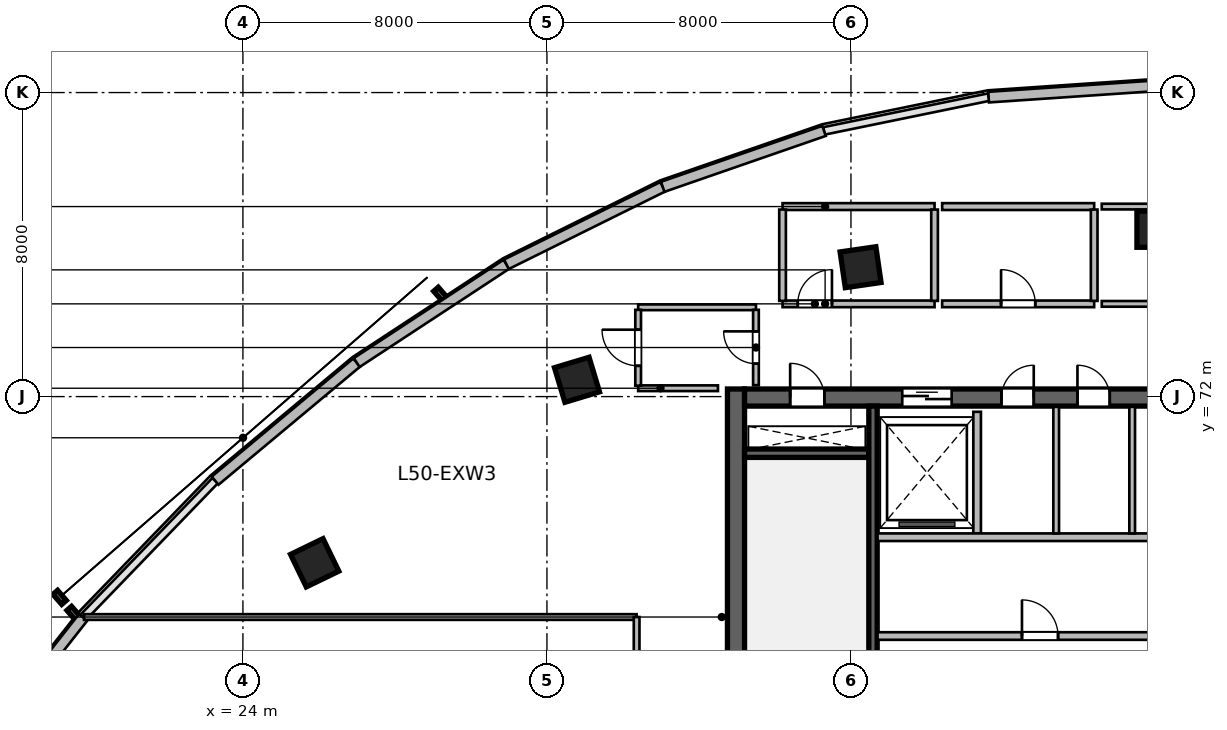
"""IFC4 building model, lengths in metres.
Left out: names, types, materials, properties, quantities, classifications, styles, units other than length and angle.
Written with IfcOpenShell. Run it as: python <this file> out.ifc"""

import sys

from ifc_helpers import new_model, si_unit, direction, frame, frame_2d, origin, origin_2d, place, context, subcontext, project, spatial, rectangle, extrude, source, transform, mapped, element, fill, save


model = new_model("IFC4")
c1 = context("Model", 3, precision=1e-05, world=origin(), true_north=direction((0.0, 1.0)))
c2 = subcontext(c1, "Body", "Model", "MODEL_VIEW")
j1 = project(units=[si_unit("LENGTHUNIT", "METRE"), si_unit("PLANEANGLEUNIT", "RADIAN")], contexts=[c1])
p1 = place(None, origin())
s1 = spatial("IfcSite", under=j1, at=p1, CompositionType="ELEMENT")
p2 = place(p1, origin())
s2 = spatial("IfcBuilding", under=s1, at=p2, CompositionType="ELEMENT")
p3 = place(p2, frame((0.0, 0.0, 207.9)))
s3 = spatial("IfcBuildingStorey", under=s2, at=p3, CompositionType="ELEMENT", Elevation=207.9)
m1 = source(origin(), c2, "Body", "SweptSolid", [
    extrude(rectangle(XDim=12.0, YDim=0.45, at=frame_2d((6.0, 0.0))), origin(), (0.0, 0.0, 1.0), 3.9),
])
p4 = place(p3, frame((36.975, 60.2, 0.0), z_axis=(0.0, 0.0, 1.0), x_axis=(0.0, 1.0, 0.0)))
e1 = element("IfcWall", 1, at=p4, inside=s3, PredefinedType="SHEAR", context=c2, shape_type="MappedRepresentation", body=[
    mapped(m1, transform((0.0, 0.0, 0.0), scale=1.0)),
])
m2 = source(origin(), c2, "Body", "SweptSolid", [
    extrude(rectangle(XDim=21.6, YDim=0.45, at=frame_2d((10.8, 0.0))), origin(), (0.0, 0.0, 1.0), 3.9),
])
p5 = place(p3, frame((37.2, 71.975, 0.0), z_axis=(0.0, 0.0, 1.0), x_axis=(1.0, 0.0, 0.0)))
e2 = element("IfcWall", 2, at=p5, inside=s3, PredefinedType="SHEAR", context=c2, shape_type="MappedRepresentation", body=[
    mapped(m2, transform((0.0, 0.0, 0.0), scale=1.0)),
])
p6 = place(p5, frame((1.2, 0.0, 0.0)))
e3 = element("IfcOpeningElement", 3, at=p6, cuts=e2, PredefinedType="OPENING", context=c2, shape_type="SweptSolid", body=[
    extrude(rectangle(XDim=0.9, YDim=2.1, at=frame_2d((0.45, 1.05))), frame((0.0, 0.235, 0.0), z_axis=(0.0, -1.0, 0.0), x_axis=(1.0, 0.0, 0.0)), (0.0, 0.0, 1.0), 0.47),
])
p7 = place(p5, frame((14.7, 0.0, 0.0)))
e4 = element("IfcOpeningElement", 4, at=p7, cuts=e2, PredefinedType="OPENING", context=c2, shape_type="SweptSolid", body=[
    extrude(rectangle(XDim=1.2, YDim=2.15, at=frame_2d((0.6, 1.075))), frame((0.0, 0.235, 0.0), z_axis=(0.0, -1.0, 0.0), x_axis=(1.0, 0.0, 0.0)), (0.0, 0.0, 1.0), 0.47),
])
p8 = place(p5, frame((4.15, 0.0, 0.0)))
e5 = element("IfcOpeningElement", 5, at=p8, cuts=e2, PredefinedType="OPENING", context=c2, shape_type="SweptSolid", body=[
    extrude(rectangle(XDim=1.3, YDim=2.15, at=frame_2d((0.65, 1.075))), frame((0.0, 0.235, 0.0), z_axis=(0.0, -1.0, 0.0), x_axis=(1.0, 0.0, 0.0)), (0.0, 0.0, 1.0), 0.47),
])
p9 = place(p5, frame((6.76, 0.0, 0.0)))
e6 = element("IfcOpeningElement", 6, at=p9, cuts=e2, PredefinedType="OPENING", context=c2, shape_type="SweptSolid", body=[
    extrude(rectangle(XDim=0.85, YDim=2.1, at=frame_2d((0.425, 1.05))), frame((0.0, 0.235, 0.0), z_axis=(0.0, -1.0, 0.0), x_axis=(1.0, 0.0, 0.0)), (0.0, 0.0, 1.0), 0.47),
])
p10 = place(p5, frame((8.76, 0.0, 0.0)))
e7 = element("IfcOpeningElement", 7, at=p10, cuts=e2, PredefinedType="OPENING", context=c2, shape_type="SweptSolid", body=[
    extrude(rectangle(XDim=0.85, YDim=2.1, at=frame_2d((0.425, 1.05))), frame((0.0, 0.235, 0.0), z_axis=(0.0, -1.0, 0.0), x_axis=(1.0, 0.0, 0.0)), (0.0, 0.0, 1.0), 0.47),
])
p11 = place(p5, frame((10.725, 0.0, 0.0)))
e8 = element("IfcOpeningElement", 8, at=p11, cuts=e2, PredefinedType="OPENING", context=c2, shape_type="SweptSolid", body=[
    extrude(rectangle(XDim=0.85, YDim=2.1, at=frame_2d((0.425, 1.05))), frame((0.0, 0.235, 0.0), z_axis=(0.0, -1.0, 0.0), x_axis=(1.0, 0.0, 0.0)), (0.0, 0.0, 1.0), 0.47),
])
m3 = source(origin(), c2, "Body", "SweptSolid", [
    extrude(rectangle(XDim=3.27, YDim=0.22, at=frame_2d((1.635, 0.0))), origin(), (0.0, 0.0, 1.0), 3.9),
])
p12 = place(p3, frame((37.2, 70.51, 0.0), z_axis=(0.0, 0.0, 1.0), x_axis=(1.0, 0.0, 0.0)))
e9 = element("IfcWall", 9, at=p12, inside=s3, PredefinedType="SHEAR", context=c2, shape_type="MappedRepresentation", body=[
    mapped(m3, transform((0.0, 0.0, 0.0), scale=1.0)),
])
m4 = source(origin(), c2, "Body", "SweptSolid", [
    extrude(rectangle(XDim=11.1, YDim=0.22, at=frame_2d((5.55, 0.0))), origin(), (0.0, 0.0, 1.0), 3.9),
])
p13 = place(p3, frame((40.58, 60.65, 0.0), z_axis=(0.0, 0.0, 1.0), x_axis=(0.0, 1.0, 0.0)))
e10 = element("IfcWall", 10, at=p13, inside=s3, PredefinedType="SHEAR", context=c2, shape_type="MappedRepresentation", body=[
    mapped(m4, transform((0.0, 0.0, 0.0), scale=1.0)),
])
m5 = source(origin(), c2, "Body", "SweptSolid", [
    extrude(rectangle(XDim=0.95, YDim=0.95, at=origin_2d()), origin(), (0.0, 0.0, 1.0), 3.9),
])
for number, where, z_axis, x_axis in (
    (11, (25.888, 67.627, 0.0), (0.0, 0.0, 1.0), (-0.436, 0.9, 0.0)),
    (12, (32.791, 72.442, 0.0), (0.0, 0.0, 1.0), (-0.289, 0.957, 0.0)),
    (13, (40.253, 75.404, 0.0), (0.0, 0.0, 1.0), (-0.143, 0.99, 0.0)),
    (14, (48.0, 76.404, 0.0), (0.0, 0.0, 1.0), (0.0, 1.0, 0.0)),
):
    element("IfcColumn", number, at=place(p3, frame(where, z_axis=z_axis, x_axis=x_axis)), inside=s3, PredefinedType="COLUMN", context=c2, shape_type="MappedRepresentation", body=[
        mapped(m5, transform((0.0, 0.0, 0.0), scale=1.0)),
    ])
m6 = source(origin(), c2, "Body", "SweptSolid", [
    extrude(rectangle(XDim=5.153, YDim=0.28, at=frame_2d((2.577, 0.0))), origin(), (0.0, 0.0, 1.0), 3.64),
])
p14 = place(p3, frame((16.609, 62.14, 0.0), z_axis=(0.0, 0.0, 1.0), x_axis=(0.618179283891, 0.786037132054, 0.0)))
e15 = element("IfcWall", 15, at=p14, inside=s3, PredefinedType="SOLIDWALL", context=c2, shape_type="MappedRepresentation", body=[
    mapped(m6, transform((0.0, 0.0, 0.0), scale=1.0)),
])
m7 = source(origin(), c2, "Body", "SweptSolid", [
    extrude(rectangle(XDim=4.852, YDim=0.28, at=frame_2d((2.426, 0.0))), origin(), (0.0, 0.0, 1.0), 3.64),
])
p15 = place(p3, frame((23.268, 69.788, 0.0), z_axis=(0.0, 0.0, 1.0), x_axis=(0.767936605821, 0.640525853843, 0.0)))
e16 = element("IfcWall", 16, at=p15, inside=s3, PredefinedType="SOLIDWALL", context=c2, shape_type="MappedRepresentation", body=[
    mapped(m7, transform((0.0, 0.0, 0.0), scale=1.0)),
])
m8 = source(origin(), c2, "Body", "SweptSolid", [
    extrude(rectangle(XDim=4.713, YDim=0.28, at=frame_2d((2.356, 0.0))), origin(), (0.0, 0.0, 1.0), 3.64),
])
p16 = place(p3, frame((26.994, 72.896, 0.0), z_axis=(0.0, 0.0, 1.0), x_axis=(0.835974386457, 0.548768462275, 0.0)))
e17 = element("IfcWall", 17, at=p16, inside=s3, PredefinedType="SOLIDWALL", context=c2, shape_type="MappedRepresentation", body=[
    mapped(m8, transform((0.0, 0.0, 0.0), scale=1.0)),
])
m9 = source(origin(), c2, "Body", "SweptSolid", [
    extrude(rectangle(XDim=4.59, YDim=0.28, at=frame_2d((2.295, 0.0))), origin(), (0.0, 0.0, 1.0), 3.64),
])
p17 = place(p3, frame((30.934, 75.482, 0.0), z_axis=(0.0, 0.0, 1.0), x_axis=(0.895974834987, 0.444104824418, 0.0)))
e18 = element("IfcWall", 18, at=p17, inside=s3, PredefinedType="SOLIDWALL", context=c2, shape_type="MappedRepresentation", body=[
    mapped(m9, transform((0.0, 0.0, 0.0), scale=1.0)),
])
m10 = source(origin(), c2, "Body", "SweptSolid", [
    extrude(rectangle(XDim=4.492, YDim=0.28, at=frame_2d((2.246, 0.0))), origin(), (0.0, 0.0, 1.0), 3.64),
])
p18 = place(p3, frame((35.046, 77.52, 0.0), z_axis=(0.0, 0.0, 1.0), x_axis=(0.944872297412, 0.32743906545, 0.0)))
e19 = element("IfcWall", 19, at=p18, inside=s3, PredefinedType="SOLIDWALL", context=c2, shape_type="MappedRepresentation", body=[
    mapped(m10, transform((0.0, 0.0, 0.0), scale=1.0)),
])
m11 = source(origin(), c2, "Body", "SweptSolid", [
    extrude(rectangle(XDim=4.387, YDim=0.28, at=frame_2d((2.193, 0.0))), origin(), (0.0, 0.0, 1.0), 3.64),
])
p19 = place(p3, frame((43.623, 79.879, 0.0), z_axis=(0.0, 0.0, 1.0), x_axis=(0.997703650546, 0.06773053733, 0.0)))
e20 = element("IfcWall", 20, at=p19, inside=s3, PredefinedType="SOLIDWALL", context=c2, shape_type="MappedRepresentation", body=[
    mapped(m11, transform((0.0, 0.0, 0.0), scale=1.0)),
])
m12 = source(origin(), c2, "Body", "SweptSolid", [
    extrude(rectangle(XDim=3.2, YDim=0.2, at=frame_2d((1.6, 0.0))), origin(), (0.0, 0.0, 1.0), 3.64),
])
p20 = place(p3, frame((43.32, 68.4, 0.0), z_axis=(0.0, 0.0, 1.0), x_axis=(0.0, 1.0, 0.0)))
e21 = element("IfcWall", 21, at=p20, inside=s3, PredefinedType="SOLIDWALL", context=c2, shape_type="MappedRepresentation", body=[
    mapped(m12, transform((0.0, 0.0, 0.0), scale=1.0)),
])
m13 = source(origin(), c2, "Body", "SweptSolid", [
    extrude(rectangle(XDim=8.8, YDim=0.2, at=frame_2d((4.4, 0.0))), origin(), (0.0, 0.0, 1.0), 3.64),
])
p21 = place(p3, frame((40.7, 68.3, 0.0), z_axis=(0.0, 0.0, 1.0), x_axis=(1.0, 0.0, 0.0)))
e22 = element("IfcWall", 22, at=p21, inside=s3, PredefinedType="SOLIDWALL", context=c2, shape_type="MappedRepresentation", body=[
    mapped(m13, transform((0.0, 0.0, 0.0), scale=1.0)),
])
m14 = source(origin(), c2, "Body", "SweptSolid", [
    extrude(rectangle(XDim=3.33, YDim=0.15, at=frame_2d((1.665, 0.0))), origin(), (0.0, 0.0, 1.0), 3.64),
])
for number, where, z_axis, x_axis in (
    (23, (45.4, 68.4, 0.0), (0.0, 0.0, 1.0), (0.0, 1.0, 0.0)),
    (24, (47.4, 68.4, 0.0), (0.0, 0.0, 1.0), (0.0, 1.0, 0.0)),
):
    element("IfcWall", number, at=place(p3, frame(where, z_axis=z_axis, x_axis=x_axis)), inside=s3, PredefinedType="PARTITIONING", context=c2, shape_type="MappedRepresentation", body=[
        mapped(m14, transform((0.0, 0.0, 0.0), scale=1.0)),
    ])
p22 = place(p3, frame((40.7, 65.7, 0.0), z_axis=(0.0, 0.0, 1.0), x_axis=(1.0, 0.0, 0.0)))
e25 = element("IfcWall", 25, at=p22, inside=s3, PredefinedType="SOLIDWALL", context=c2, shape_type="MappedRepresentation", body=[
    mapped(m13, transform((0.0, 0.0, 0.0), scale=1.0)),
])
p23 = place(p22, frame((3.8, 0.0, 0.0)))
e26 = element("IfcOpeningElement", 26, at=p23, cuts=e25, PredefinedType="OPENING", context=c2, shape_type="SweptSolid", body=[
    extrude(rectangle(XDim=0.95, YDim=2.15, at=frame_2d((0.475, 1.075))), frame((0.0, 0.11, 0.0), z_axis=(0.0, -1.0, 0.0), x_axis=(1.0, 0.0, 0.0)), (0.0, 0.0, 1.0), 0.22),
])
m15 = source(origin(), c2, "Body", "SweptSolid", [
    extrude(rectangle(XDim=2.1, YDim=0.15, at=frame_2d((1.05, 0.0))), origin(), (0.0, 0.0, 1.0), 3.64),
])
p24 = place(p3, frame((34.4, 72.22, 0.0), z_axis=(0.0, 0.0, 1.0), x_axis=(1.0, 0.0, 0.0)))
e27 = element("IfcWall", 27, at=p24, inside=s3, PredefinedType="PARTITIONING", context=c2, shape_type="MappedRepresentation", body=[
    mapped(m15, transform((0.0, 0.0, 0.0), scale=1.0)),
])
m16 = source(origin(), c2, "Body", "SweptSolid", [
    extrude(rectangle(XDim=3.1, YDim=0.15, at=frame_2d((1.55, 0.0))), origin(), (0.0, 0.0, 1.0), 3.071),
])
p25 = place(p3, frame((34.4, 74.35, 0.0), z_axis=(0.0, 0.0, 1.0), x_axis=(1.0, 0.0, 0.0)))
e28 = element("IfcWall", 28, at=p25, inside=s3, PredefinedType="PARTITIONING", context=c2, shape_type="MappedRepresentation", body=[
    mapped(m16, transform((0.0, 0.0, 0.0), scale=1.0)),
])
m17 = source(origin(), c2, "Body", "SweptSolid", [
    extrude(rectangle(XDim=1.995, YDim=0.15, at=frame_2d((0.998, 0.0))), origin(), (0.0, 0.0, 1.0), 3.64),
])
p26 = place(p3, frame((34.4, 72.288, 0.0), z_axis=(0.0, 0.0, 1.0), x_axis=(0.0, 1.0, 0.0)))
e29 = element("IfcWall", 29, at=p26, inside=s3, PredefinedType="PARTITIONING", context=c2, shape_type="MappedRepresentation", body=[
    mapped(m17, transform((0.0, 0.0, 0.0), scale=1.0)),
])
p27 = place(p26, frame((0.522, 0.0, 0.0)))
e30 = element("IfcOpeningElement", 30, at=p27, cuts=e29, PredefinedType="OPENING", context=c2, shape_type="SweptSolid", body=[
    extrude(rectangle(XDim=0.95, YDim=2.1, at=frame_2d((0.475, 1.05))), frame((0.0, 0.085, 0.0), z_axis=(0.0, -1.0, 0.0), x_axis=(1.0, 0.0, 0.0)), (0.0, 0.0, 1.0), 0.17),
])
m18 = source(origin(), c2, "Body", "SweptSolid", [
    extrude(rectangle(XDim=1.982, YDim=0.15, at=frame_2d((0.991, 0.0))), origin(), (0.0, 0.0, 1.0), 3.64),
])
p28 = place(p3, frame((37.5, 72.3, 0.0), z_axis=(0.0, 0.0, 1.0), x_axis=(0.0, 1.0, 0.0)))
e31 = element("IfcWall", 31, at=p28, inside=s3, PredefinedType="PARTITIONING", context=c2, shape_type="MappedRepresentation", body=[
    mapped(m18, transform((0.0, 0.0, 0.0), scale=1.0)),
])
p29 = place(p28, frame((0.566, 0.0, 0.0)))
e32 = element("IfcOpeningElement", 32, at=p29, cuts=e31, PredefinedType="OPENING", context=c2, shape_type="SweptSolid", body=[
    extrude(rectangle(XDim=0.85, YDim=2.1, at=frame_2d((0.425, 1.05))), frame((0.0, 0.085, 0.0), z_axis=(0.0, -1.0, 0.0), x_axis=(1.0, 0.0, 0.0)), (0.0, 0.0, 1.0), 0.17),
])
m19 = source(origin(), c2, "Body", "SweptSolid", [
    extrude(rectangle(XDim=4.0, YDim=0.175, at=frame_2d((2.0, 0.0))), origin(), (0.0, 0.0, 1.0), 3.64),
])
p30 = place(p3, frame((38.2, 74.44, 0.0), z_axis=(0.0, 0.0, 1.0), x_axis=(1.0, 0.0, 0.0)))
e33 = element("IfcWall", 33, at=p30, inside=s3, PredefinedType="PARTITIONING", context=c2, shape_type="MappedRepresentation", body=[
    mapped(m19, transform((0.0, 0.0, 0.0), scale=1.0)),
])
p31 = place(p30, frame((0.4, 0.0, 0.0)))
e34 = element("IfcOpeningElement", 34, at=p31, cuts=e33, PredefinedType="OPENING", context=c2, shape_type="SweptSolid", body=[
    extrude(rectangle(XDim=0.9, YDim=2.08, at=frame_2d((0.45, 1.04))), frame((0.0, 0.098, 0.0), z_axis=(0.0, -1.0, 0.0), x_axis=(1.0, 0.0, 0.0)), (0.0, 0.0, 1.0), 0.195),
])
m20 = source(origin(), c2, "Body", "SweptSolid", [
    extrude(rectangle(XDim=4.0, YDim=0.18, at=frame_2d((2.0, 0.0))), origin(), (0.0, 0.0, 1.0), 3.64),
])
p32 = place(p3, frame((38.2, 77.0, 0.0), z_axis=(0.0, 0.0, 1.0), x_axis=(1.0, 0.0, 0.0)))
e35 = element("IfcWall", 35, at=p32, inside=s3, PredefinedType="PLUMBINGWALL", context=c2, shape_type="MappedRepresentation", body=[
    mapped(m20, transform((0.0, 0.0, 0.0), scale=1.0)),
])
m21 = source(origin(), c2, "Body", "SweptSolid", [
    extrude(rectangle(XDim=2.403, YDim=0.175, at=frame_2d((1.201, 0.0))), origin(), (0.0, 0.0, 1.0), 3.64),
])
for number, where, z_axis, x_axis in (
    (36, (38.2, 74.519, 0.0), (0.0, 0.0, 1.0), (0.0, 1.0, 0.0)),
    (37, (42.2, 74.519, 0.0), (0.0, 0.0, 1.0), (0.0, 1.0, 0.0)),
):
    element("IfcWall", number, at=place(p3, frame(where, z_axis=z_axis, x_axis=x_axis)), inside=s3, PredefinedType="PARTITIONING", context=c2, shape_type="MappedRepresentation", body=[
        mapped(m21, transform((0.0, 0.0, 0.0), scale=1.0)),
    ])
p33 = place(p3, frame((42.4, 74.44, 0.0), z_axis=(0.0, 0.0, 1.0), x_axis=(1.0, 0.0, 0.0)))
e38 = element("IfcWall", 38, at=p33, inside=s3, PredefinedType="PARTITIONING", context=c2, shape_type="MappedRepresentation", body=[
    mapped(m19, transform((0.0, 0.0, 0.0), scale=1.0)),
])
p34 = place(p33, frame((1.55, 0.0, 0.0)))
e39 = element("IfcOpeningElement", 39, at=p34, cuts=e38, PredefinedType="OPENING", context=c2, shape_type="SweptSolid", body=[
    extrude(rectangle(XDim=0.9, YDim=2.08, at=frame_2d((0.45, 1.04))), frame((0.0, 0.098, 0.0), z_axis=(0.0, -1.0, 0.0), x_axis=(1.0, 0.0, 0.0)), (0.0, 0.0, 1.0), 0.195),
])
p35 = place(p3, frame((42.4, 77.0, 0.0), z_axis=(0.0, 0.0, 1.0), x_axis=(1.0, 0.0, 0.0)))
e40 = element("IfcWall", 40, at=p35, inside=s3, PredefinedType="PLUMBINGWALL", context=c2, shape_type="MappedRepresentation", body=[
    mapped(m20, transform((0.0, 0.0, 0.0), scale=1.0)),
])
p36 = place(p3, frame((46.4, 74.519, 0.0), z_axis=(0.0, 0.0, 1.0), x_axis=(0.0, 1.0, 0.0)))
e41 = element("IfcWall", 41, at=p36, inside=s3, PredefinedType="PARTITIONING", context=c2, shape_type="MappedRepresentation", body=[
    mapped(m21, transform((0.0, 0.0, 0.0), scale=1.0)),
])
m22 = source(origin(), c2, "Body", "SweptSolid", [
    extrude(rectangle(XDim=4.4, YDim=0.15, at=frame_2d((2.2, 0.0))), origin(), (0.0, 0.0, 1.0), 3.64),
])
p37 = place(p3, frame((46.6, 74.44, 0.0), z_axis=(0.0, 0.0, 1.0), x_axis=(1.0, 0.0, 0.0)))
e42 = element("IfcWall", 42, at=p37, inside=s3, PredefinedType="PARTITIONING", context=c2, shape_type="MappedRepresentation", body=[
    mapped(m22, transform((0.0, 0.0, 0.0), scale=1.0)),
])
p38 = place(p37, frame((1.725, 0.0, 0.0)))
e43 = element("IfcOpeningElement", 43, at=p38, cuts=e42, PredefinedType="OPENING", context=c2, shape_type="SweptSolid", body=[
    extrude(rectangle(XDim=0.95, YDim=2.1, at=frame_2d((0.475, 1.05))), frame((0.0, 0.085, 0.0), z_axis=(0.0, -1.0, 0.0), x_axis=(1.0, 0.0, 0.0)), (0.0, 0.0, 1.0), 0.17),
])
p39 = place(p3, frame((46.6, 77.0, 0.0), z_axis=(0.0, 0.0, 1.0), x_axis=(1.0, 0.0, 0.0)))
e44 = element("IfcWall", 44, at=p39, inside=s3, PredefinedType="PARTITIONING", context=c2, shape_type="MappedRepresentation", body=[
    mapped(m22, transform((0.0, 0.0, 0.0), scale=1.0)),
])
m23 = source(origin(), c2, "Body", "SweptSolid", [
    extrude(rectangle(XDim=14.542, YDim=0.15, at=frame_2d((7.271, 0.0))), origin(), (0.0, 0.0, 1.0), 3.64),
])
p40 = place(p3, frame((19.818, 66.2, 0.0), z_axis=(0.0, 0.0, 1.0), x_axis=(1.0, 0.0, 0.0)))
e45 = element("IfcWall", 45, at=p40, inside=s3, PredefinedType="PARTITIONING", context=c2, shape_type="MappedRepresentation", body=[
    mapped(m23, transform((0.0, 0.0, 0.0), scale=1.0)),
])
m24 = source(origin(), c2, "Body", "SweptSolid", [
    extrude(rectangle(XDim=4.7, YDim=0.15, at=frame_2d((2.35, 0.0))), origin(), (0.0, 0.0, 1.0), 3.64),
])
p41 = place(p3, frame((34.36, 61.5, 0.0), z_axis=(0.0, 0.0, 1.0), x_axis=(0.0, 1.0, 0.0)))
e46 = element("IfcWall", 46, at=p41, inside=s3, PredefinedType="PARTITIONING", context=c2, shape_type="MappedRepresentation", body=[
    mapped(m24, transform((0.0, 0.0, 0.0), scale=1.0)),
])
p42 = place(p41, frame((1.875, 0.0, 0.0)))
e47 = element("IfcOpeningElement", 47, at=p42, cuts=e46, PredefinedType="OPENING", context=c2, shape_type="SweptSolid", body=[
    extrude(rectangle(XDim=0.95, YDim=2.1, at=frame_2d((0.475, 1.05))), frame((0.0, 0.085, 0.0), z_axis=(0.0, -1.0, 0.0), x_axis=(1.0, 0.0, 0.0)), (0.0, 0.0, 1.0), 0.17),
])
m25 = source(origin(), c2, "Body", "SweptSolid", [
    extrude(rectangle(XDim=0.9, YDim=2.1, at=frame_2d((0.45, 1.05))), frame((0.0, 0.025, 0.0), z_axis=(0.0, -1.0, 0.0), x_axis=(1.0, 0.0, 0.0)), (0.0, 0.0, 1.0), 0.05),
])
p43 = place(p6, origin())
e48 = element("IfcDoor", 48, at=p43, inside=s3, OperationType="SINGLE_SWING_LEFT", PredefinedType="DOOR", context=c2, shape_type="MappedRepresentation", body=[
    mapped(m25, transform((0.0, 0.0, 0.0), scale=1.0)),
])
fill(e3, e48)
m26 = source(origin(), c2, "Body", "SweptSolid", [
    extrude(rectangle(XDim=1.3, YDim=2.15, at=frame_2d((0.65, 1.075))), frame((0.0, 0.025, 0.0), z_axis=(0.0, -1.0, 0.0), x_axis=(1.0, 0.0, 0.0)), (0.0, 0.0, 1.0), 0.05),
])
p44 = place(p8, origin())
e49 = element("IfcDoor", 49, at=p44, inside=s3, OperationType="DOUBLE_DOOR_SLIDING", PredefinedType="DOOR", context=c2, shape_type="MappedRepresentation", body=[
    mapped(m26, transform((0.0, 0.0, 0.0), scale=1.0)),
])
fill(e5, e49)
m27 = source(origin(), c2, "Body", "SweptSolid", [
    extrude(rectangle(XDim=0.85, YDim=2.1, at=frame_2d((0.425, 1.05))), frame((0.0, 0.025, 0.0), z_axis=(0.0, -1.0, 0.0), x_axis=(1.0, 0.0, 0.0)), (0.0, 0.0, 1.0), 0.05),
])
p45 = place(p9, origin())
e50 = element("IfcDoor", 50, at=p45, inside=s3, OperationType="SINGLE_SWING_RIGHT", PredefinedType="DOOR", context=c2, shape_type="MappedRepresentation", body=[
    mapped(m27, transform((0.0, 0.0, 0.0), scale=1.0)),
])
fill(e6, e50)
p46 = place(p10, origin())
e51 = element("IfcDoor", 51, at=p46, inside=s3, OperationType="SINGLE_SWING_LEFT", PredefinedType="DOOR", context=c2, shape_type="MappedRepresentation", body=[
    mapped(m27, transform((0.0, 0.0, 0.0), scale=1.0)),
])
fill(e7, e51)
m28 = source(origin(), c2, "Body", "SweptSolid", [
    extrude(rectangle(XDim=0.95, YDim=2.15, at=frame_2d((0.475, 1.075))), frame((0.0, 0.025, 0.0), z_axis=(0.0, -1.0, 0.0), x_axis=(1.0, 0.0, 0.0)), (0.0, 0.0, 1.0), 0.05),
])
p47 = place(p23, origin())
e52 = element("IfcDoor", 52, at=p47, inside=s3, OperationType="SINGLE_SWING_LEFT", PredefinedType="DOOR", context=c2, shape_type="MappedRepresentation", body=[
    mapped(m28, transform((0.0, 0.0, 0.0), scale=1.0)),
])
fill(e26, e52)
p48 = place(p29, origin())
e53 = element("IfcDoor", 53, at=p48, inside=s3, OperationType="SINGLE_SWING_RIGHT", PredefinedType="DOOR", context=c2, shape_type="MappedRepresentation", body=[
    mapped(m27, transform((0.0, 0.0, 0.0), scale=1.0)),
])
fill(e32, e53)
m29 = source(origin(), c2, "Body", "SweptSolid", [
    extrude(rectangle(XDim=0.9, YDim=2.08, at=frame_2d((0.45, 1.04))), frame((0.0, 0.025, 0.0), z_axis=(0.0, -1.0, 0.0), x_axis=(1.0, 0.0, 0.0)), (0.0, 0.0, 1.0), 0.05),
])
p49 = place(p31, origin())
e54 = element("IfcDoor", 54, at=p49, inside=s3, OperationType="SINGLE_SWING_RIGHT", PredefinedType="DOOR", context=c2, shape_type="MappedRepresentation", body=[
    mapped(m29, transform((0.0, 0.0, 0.0), scale=1.0)),
])
fill(e34, e54)
p50 = place(p34, origin())
e55 = element("IfcDoor", 55, at=p50, inside=s3, OperationType="SINGLE_SWING_LEFT", PredefinedType="DOOR", context=c2, shape_type="MappedRepresentation", body=[
    mapped(m29, transform((0.0, 0.0, 0.0), scale=1.0)),
])
fill(e39, e55)
m30 = source(origin(), c2, "Body", "SweptSolid", [
    extrude(rectangle(XDim=0.95, YDim=2.1, at=frame_2d((0.475, 1.05))), frame((0.0, 0.025, 0.0), z_axis=(0.0, -1.0, 0.0), x_axis=(1.0, 0.0, 0.0)), (0.0, 0.0, 1.0), 0.05),
])
p51 = place(p27, origin())
e56 = element("IfcDoor", 56, at=p51, inside=s3, OperationType="SINGLE_SWING_RIGHT", PredefinedType="DOOR", context=c2, shape_type="MappedRepresentation", body=[
    mapped(m30, transform((0.0, 0.0, 0.0), scale=1.0)),
])
fill(e30, e56)
save(model, sys.argv[1])
